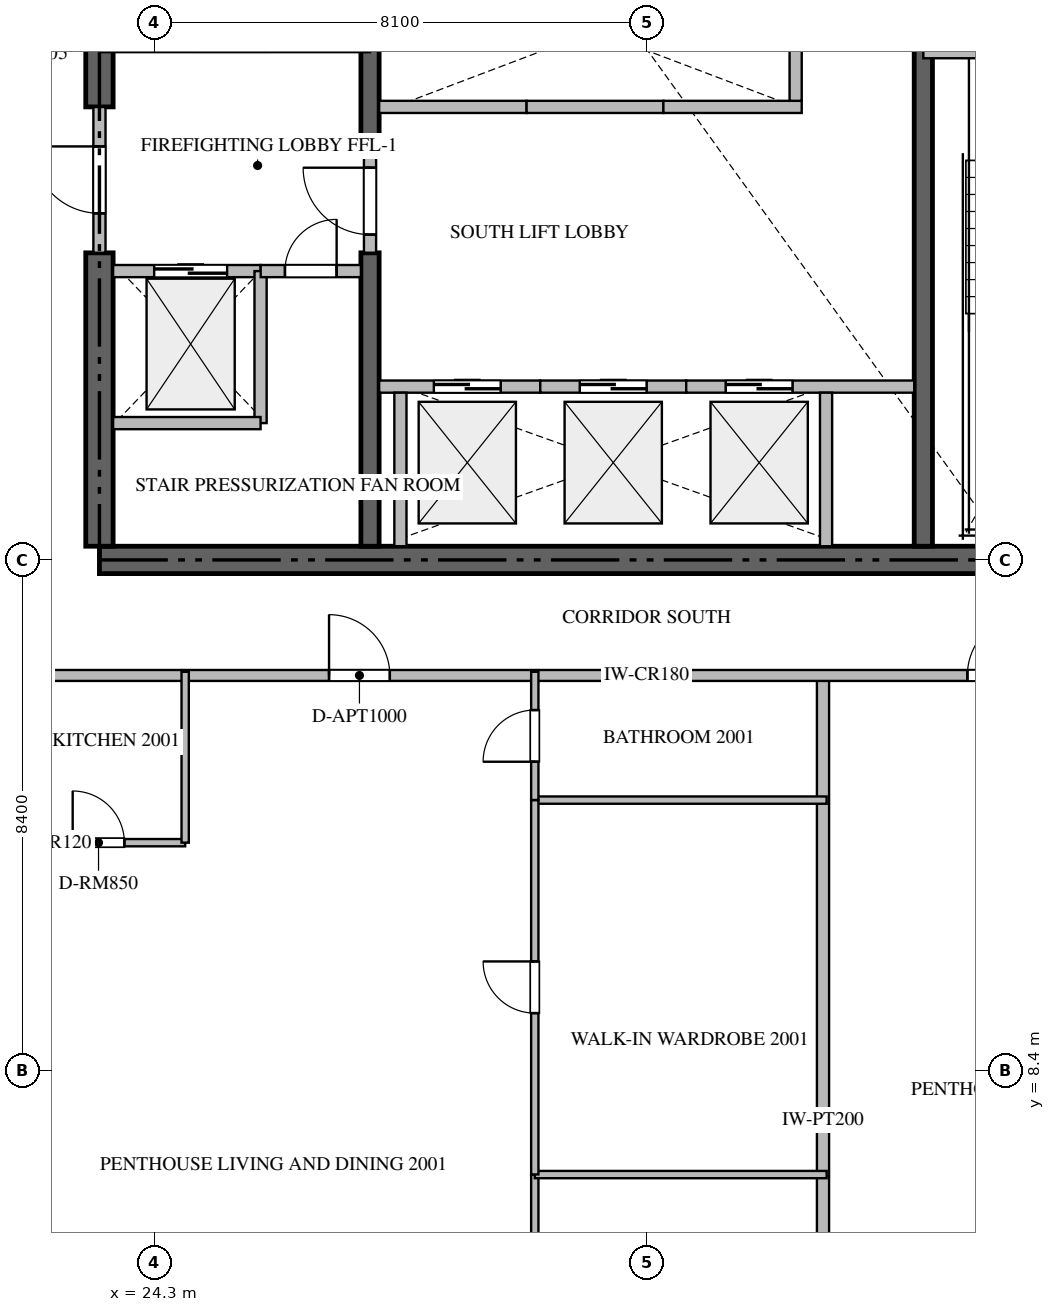
"""IFC4 building model, lengths in metres.
Left out: names, types, materials, properties, quantities, classifications, styles, units other than length and angle.
Written with IfcOpenShell. Run it as: python <this file> out.ifc"""

import sys

from ifc_helpers import new_model, si_unit, direction, frame, frame_2d, origin, place, context, subcontext, project, spatial, rectangle, extrude, source, transform, mapped, element, fill, save


model = new_model("IFC4")
c1 = context("Model", 3, precision=1e-05, world=origin(), true_north=direction((0.0, 1.0)))
c2 = subcontext(c1, "Body", "Model", "MODEL_VIEW")
j1 = project(units=[si_unit("LENGTHUNIT", "METRE"), si_unit("PLANEANGLEUNIT", "RADIAN")], contexts=[c1])
p1 = place(None, origin())
s1 = spatial("IfcSite", under=j1, at=p1, CompositionType="ELEMENT")
p2 = place(p1, origin())
s2 = spatial("IfcBuilding", under=s1, at=p2, CompositionType="ELEMENT")
p3 = place(p2, frame((0.0, 0.0, 82.95)))
s3 = spatial("IfcBuildingStorey", under=s2, at=p3, CompositionType="ELEMENT", Elevation=82.95)
p4 = place(p3, frame((23.4, 16.8, -0.26), z_axis=(0.0, 0.0, 1.0), x_axis=(1.0, 0.0, 0.0)))
e1 = element("IfcWall", 1, at=p4, inside=s3, PredefinedType="SHEAR", context=c2, shape_type="SweptSolid", body=[
    extrude(rectangle(XDim=18.0, YDim=0.45, at=frame_2d((9.0, 0.0))), origin(), (0.0, 0.0, 1.0), 3.748),
])
p5 = place(p3, frame((23.4, 17.025, -0.26), z_axis=(0.0, 0.0, 1.0), x_axis=(0.0, 1.0, 0.0)))
e2 = element("IfcWall", 2, at=p5, inside=s3, PredefinedType="SHEAR", context=c2, shape_type="SweptSolid", body=[
    extrude(rectangle(XDim=4.825, YDim=0.45, at=frame_2d((2.413, 0.0))), origin(), (0.0, 0.0, 1.0), 3.748),
])
p6 = place(p3, frame((23.4, 24.25, -0.26), z_axis=(0.0, 0.0, 1.0), x_axis=(0.0, 1.0, 0.0)))
e3 = element("IfcWall", 3, at=p6, inside=s3, PredefinedType="SHEAR", context=c2, shape_type="SweptSolid", body=[
    extrude(rectangle(XDim=9.125, YDim=0.45, at=frame_2d((4.562, 0.0))), origin(), (0.0, 0.0, 1.0), 3.748),
])
p7 = place(p3, frame((27.85, 17.025, -0.26), z_axis=(0.0, 0.0, 1.0), x_axis=(0.0, 1.0, 0.0)))
e4 = element("IfcWall", 4, at=p7, inside=s3, PredefinedType="SHEAR", context=c2, shape_type="SweptSolid", body=[
    extrude(rectangle(XDim=4.825, YDim=0.3, at=frame_2d((2.413, 0.0))), origin(), (0.0, 0.0, 1.0), 3.748),
])
p8 = place(p3, frame((27.85, 23.55, -0.26), z_axis=(0.0, 0.0, 1.0), x_axis=(0.0, 1.0, 0.0)))
e5 = element("IfcWall", 5, at=p8, inside=s3, PredefinedType="SHEAR", context=c2, shape_type="SweptSolid", body=[
    extrude(rectangle(XDim=9.825, YDim=0.3, at=frame_2d((4.913, 0.0))), origin(), (0.0, 0.0, 1.0), 3.748),
])
p9 = place(p3, frame((36.95, 17.025, -0.26), z_axis=(0.0, 0.0, 1.0), x_axis=(0.0, 1.0, 0.0)))
e6 = element("IfcWall", 6, at=p9, inside=s3, PredefinedType="SHEAR", context=c2, shape_type="SweptSolid", body=[
    extrude(rectangle(XDim=8.325, YDim=0.3, at=frame_2d((4.163, 0.0))), origin(), (0.0, 0.0, 1.0), 3.748),
])
p10 = place(p3, frame((36.95, 25.15, 0.0), z_axis=(0.0, 0.0, 1.0), x_axis=(1.0, 0.0, 0.0)))
e7 = element("IfcWall", 7, at=p10, inside=s3, PredefinedType="STANDARD", context=c2, shape_type="SweptSolid", body=[
    extrude(rectangle(XDim=4.45, YDim=0.2, at=frame_2d((2.225, 0.0))), origin(), (0.0, 0.0, 1.0), 3.49),
])
p11 = place(p10, frame((1.65, 0.0, 0.0)))
e8 = element("IfcOpeningElement", 8, at=p11, cuts=e7, PredefinedType="OPENING", context=c2, shape_type="SweptSolid", body=[
    extrude(rectangle(XDim=1.1, YDim=2.15, at=frame_2d((0.55, 1.075))), frame((0.0, 0.11, 0.0), z_axis=(0.0, -1.0, 0.0), x_axis=(1.0, 0.0, 0.0)), (0.0, 0.0, 1.0), 0.22),
])
p12 = place(p3, frame((23.625, 21.55, 0.0), z_axis=(0.0, 0.0, 1.0), x_axis=(1.0, 0.0, 0.0)))
e9 = element("IfcWall", 9, at=p12, inside=s3, PredefinedType="STANDARD", context=c2, shape_type="SweptSolid", body=[
    extrude(rectangle(XDim=2.425, YDim=0.2, at=frame_2d((1.212, 0.0))), origin(), (0.0, 0.0, 1.0), 3.49),
])
p13 = place(p12, frame((0.675, 0.0, 0.0)))
e10 = element("IfcOpeningElement", 10, at=p13, cuts=e9, PredefinedType="OPENING", context=c2, shape_type="SweptSolid", body=[
    extrude(rectangle(XDim=1.2, YDim=2.2, at=frame_2d((0.6, 1.1))), frame((0.0, 0.11, 0.0), z_axis=(0.0, -1.0, 0.0), x_axis=(1.0, 0.0, 0.0)), (0.0, 0.0, 1.0), 0.22),
])
p14 = place(p3, frame((28.0, 19.65, 0.0), z_axis=(0.0, 0.0, 1.0), x_axis=(1.0, 0.0, 0.0)))
e11 = element("IfcWall", 11, at=p14, inside=s3, PredefinedType="STANDARD", context=c2, shape_type="SweptSolid", body=[
    extrude(rectangle(XDim=2.65, YDim=0.2, at=frame_2d((1.325, 0.0))), origin(), (0.0, 0.0, 1.0), 3.49),
])
p15 = place(p14, frame((0.9, 0.0, 0.0)))
e12 = element("IfcOpeningElement", 12, at=p15, cuts=e11, PredefinedType="OPENING", context=c2, shape_type="SweptSolid", body=[
    extrude(rectangle(XDim=1.1, YDim=2.2, at=frame_2d((0.55, 1.1))), frame((0.0, 0.11, 0.0), z_axis=(0.0, -1.0, 0.0), x_axis=(1.0, 0.0, 0.0)), (0.0, 0.0, 1.0), 0.22),
])
p16 = place(p3, frame((28.35, 17.025, 0.0), z_axis=(0.0, 0.0, 1.0), x_axis=(0.0, 1.0, 0.0)))
e13 = element("IfcWall", 13, at=p16, inside=s3, PredefinedType="STANDARD", context=c2, shape_type="SweptSolid", body=[
    extrude(rectangle(XDim=2.525, YDim=0.2, at=frame_2d((1.263, 0.0))), origin(), (0.0, 0.0, 1.0), 3.49),
])
p17 = place(p3, frame((30.65, 19.65, 0.0), z_axis=(0.0, 0.0, 1.0), x_axis=(1.0, 0.0, 0.0)))
e14 = element("IfcWall", 14, at=p17, inside=s3, PredefinedType="STANDARD", context=c2, shape_type="SweptSolid", body=[
    extrude(rectangle(XDim=2.4, YDim=0.2, at=frame_2d((1.2, 0.0))), origin(), (0.0, 0.0, 1.0), 3.49),
])
p18 = place(p17, frame((0.65, 0.0, 0.0)))
e15 = element("IfcOpeningElement", 15, at=p18, cuts=e14, PredefinedType="OPENING", context=c2, shape_type="SweptSolid", body=[
    extrude(rectangle(XDim=1.1, YDim=2.2, at=frame_2d((0.55, 1.1))), frame((0.0, 0.11, 0.0), z_axis=(0.0, -1.0, 0.0), x_axis=(1.0, 0.0, 0.0)), (0.0, 0.0, 1.0), 0.22),
])
p19 = place(p3, frame((33.05, 19.65, 0.0), z_axis=(0.0, 0.0, 1.0), x_axis=(1.0, 0.0, 0.0)))
e16 = element("IfcWall", 16, at=p19, inside=s3, PredefinedType="STANDARD", context=c2, shape_type="SweptSolid", body=[
    extrude(rectangle(XDim=3.75, YDim=0.2, at=frame_2d((1.875, 0.0))), origin(), (0.0, 0.0, 1.0), 3.49),
])
p20 = place(p19, frame((0.65, 0.0, 0.0)))
e17 = element("IfcOpeningElement", 17, at=p20, cuts=e16, PredefinedType="OPENING", context=c2, shape_type="SweptSolid", body=[
    extrude(rectangle(XDim=1.1, YDim=2.2, at=frame_2d((0.55, 1.1))), frame((0.0, 0.11, 0.0), z_axis=(0.0, -1.0, 0.0), x_axis=(1.0, 0.0, 0.0)), (0.0, 0.0, 1.0), 0.22),
])
p21 = place(p3, frame((35.35, 17.025, 0.0), z_axis=(0.0, 0.0, 1.0), x_axis=(0.0, 1.0, 0.0)))
e18 = element("IfcWall", 18, at=p21, inside=s3, PredefinedType="STANDARD", context=c2, shape_type="SweptSolid", body=[
    extrude(rectangle(XDim=2.525, YDim=0.2, at=frame_2d((1.263, 0.0))), origin(), (0.0, 0.0, 1.0), 3.49),
])
p22 = place(p3, frame((28.0, 24.25, 0.0), z_axis=(0.0, 0.0, 1.0), x_axis=(1.0, 0.0, 0.0)))
e19 = element("IfcWall", 19, at=p22, inside=s3, PredefinedType="STANDARD", context=c2, shape_type="SweptSolid", body=[
    extrude(rectangle(XDim=2.425, YDim=0.2, at=frame_2d((1.212, 0.0))), origin(), (0.0, 0.0, 1.0), 3.49),
])
p23 = place(p3, frame((30.425, 24.25, 0.0), z_axis=(0.0, 0.0, 1.0), x_axis=(1.0, 0.0, 0.0)))
e20 = element("IfcWall", 20, at=p23, inside=s3, PredefinedType="STANDARD", context=c2, shape_type="SweptSolid", body=[
    extrude(rectangle(XDim=2.25, YDim=0.2, at=frame_2d((1.125, 0.0))), origin(), (0.0, 0.0, 1.0), 3.49),
])
p24 = place(p3, frame((32.675, 24.25, 0.0), z_axis=(0.0, 0.0, 1.0), x_axis=(1.0, 0.0, 0.0)))
e21 = element("IfcWall", 21, at=p24, inside=s3, PredefinedType="STANDARD", context=c2, shape_type="SweptSolid", body=[
    extrude(rectangle(XDim=2.275, YDim=0.2, at=frame_2d((1.137, 0.0))), origin(), (0.0, 0.0, 1.0), 3.49),
])
for number, where, z_axis, x_axis in (
    (22, (34.85, 24.35, 0.0), (0.0, 0.0, 1.0), (0.0, 1.0, 0.0)),
    (23, (26.05, 19.05, 0.0), (0.0, 0.0, 1.0), (0.0, 1.0, 0.0)),
):
    element("IfcWall", number, at=place(p3, frame(where, z_axis=z_axis, x_axis=x_axis)), inside=s3, PredefinedType="STANDARD", context=c2, shape_type="SweptSolid", body=[
        extrude(rectangle(XDim=2.5, YDim=0.2, at=frame_2d((1.25, 0.0))), origin(), (0.0, 0.0, 1.0), 3.49),
    ])
p25 = place(p3, frame((23.625, 19.05, 0.0), z_axis=(0.0, 0.0, 1.0), x_axis=(1.0, 0.0, 0.0)))
e24 = element("IfcWall", 24, at=p25, inside=s3, PredefinedType="STANDARD", context=c2, shape_type="SweptSolid", body=[
    extrude(rectangle(XDim=2.425, YDim=0.2, at=frame_2d((1.212, 0.0))), origin(), (0.0, 0.0, 1.0), 3.49),
])
p26 = place(p3, frame((26.052, 21.55, 0.0), z_axis=(0.0, 0.0, 1.0), x_axis=(1.0, 0.0, 0.0)))
e25 = element("IfcWall", 25, at=p26, inside=s3, PredefinedType="STANDARD", context=c2, shape_type="SweptSolid", body=[
    extrude(rectangle(XDim=1.648, YDim=0.2, at=frame_2d((0.824, 0.0))), origin(), (0.0, 0.0, 1.0), 3.49),
])
p27 = place(p26, frame((0.399, 0.0, 0.0)))
e26 = element("IfcOpeningElement", 26, at=p27, cuts=e25, PredefinedType="OPENING", context=c2, shape_type="SweptSolid", body=[
    extrude(rectangle(XDim=0.85, YDim=2.1, at=frame_2d((0.425, 1.05))), frame((0.0, 0.11, 0.0), z_axis=(0.0, -1.0, 0.0), x_axis=(1.0, 0.0, 0.0)), (0.0, 0.0, 1.0), 0.22),
])
p28 = place(p3, frame((23.4, 21.852, 0.0), z_axis=(0.0, 0.0, 1.0), x_axis=(0.0, 1.0, 0.0)))
e27 = element("IfcWall", 27, at=p28, inside=s3, PredefinedType="STANDARD", context=c2, shape_type="SweptSolid", body=[
    extrude(rectangle(XDim=2.396, YDim=0.2, at=frame_2d((1.198, 0.0))), origin(), (0.0, 0.0, 1.0), 3.49),
])
p29 = place(p28, frame((0.648, 0.0, 0.0)))
e28 = element("IfcOpeningElement", 28, at=p29, cuts=e27, PredefinedType="OPENING", context=c2, shape_type="SweptSolid", body=[
    extrude(rectangle(XDim=1.1, YDim=2.15, at=frame_2d((0.55, 1.075))), frame((0.0, 0.11, 0.0), z_axis=(0.0, -1.0, 0.0), x_axis=(1.0, 0.0, 0.0)), (0.0, 0.0, 1.0), 0.22),
])
p30 = place(p3, frame((27.85, 21.852, 0.0), z_axis=(0.0, 0.0, 1.0), x_axis=(0.0, 1.0, 0.0)))
e29 = element("IfcWall", 29, at=p30, inside=s3, PredefinedType="STANDARD", context=c2, shape_type="SweptSolid", body=[
    extrude(rectangle(XDim=1.696, YDim=0.2, at=frame_2d((0.848, 0.0))), origin(), (0.0, 0.0, 1.0), 3.49),
])
p31 = place(p30, frame((0.298, 0.0, 0.0)))
e30 = element("IfcOpeningElement", 30, at=p31, cuts=e29, PredefinedType="OPENING", context=c2, shape_type="SweptSolid", body=[
    extrude(rectangle(XDim=1.1, YDim=2.15, at=frame_2d((0.55, 1.075))), frame((0.0, 0.11, 0.0), z_axis=(0.0, -1.0, 0.0), x_axis=(1.0, 0.0, 0.0)), (0.0, 0.0, 1.0), 0.22),
])
p32 = place(p3, frame((35.3, 0.282, 0.0), z_axis=(0.0, 0.0, 1.0), x_axis=(0.0, 1.0, 0.0)))
e31 = element("IfcWall", 31, at=p32, inside=s3, PredefinedType="PARTITIONING", context=c2, shape_type="SweptSolid", body=[
    extrude(rectangle(XDim=14.618, YDim=0.2, at=frame_2d((7.309, 0.0))), origin(), (0.0, 0.0, 1.0), 3.49),
])
p33 = place(p3, frame((21.402, 14.9, 0.0), z_axis=(0.0, 0.0, 1.0), x_axis=(1.0, 0.0, 0.0)))
e32 = element("IfcWall", 32, at=p33, inside=s3, PredefinedType="PARTITIONING", context=c2, shape_type="SweptSolid", body=[
    extrude(rectangle(XDim=21.996, YDim=0.18, at=frame_2d((10.998, 0.0))), origin(), (0.0, 0.0, 1.0), 3.49),
])
p34 = place(p33, frame((5.774, 0.0, 0.0)))
e33 = element("IfcOpeningElement", 33, at=p34, cuts=e32, PredefinedType="OPENING", context=c2, shape_type="SweptSolid", body=[
    extrude(rectangle(XDim=1.0, YDim=2.15, at=frame_2d((0.5, 1.075))), frame((0.0, 0.1, 0.0), z_axis=(0.0, -1.0, 0.0), x_axis=(1.0, 0.0, 0.0)), (0.0, 0.0, 1.0), 0.2),
])
p35 = place(p33, frame((16.272, 0.0, 0.0)))
e34 = element("IfcOpeningElement", 34, at=p35, cuts=e32, PredefinedType="OPENING", context=c2, shape_type="SweptSolid", body=[
    extrude(rectangle(XDim=1.0, YDim=2.15, at=frame_2d((0.5, 1.075))), frame((0.0, 0.1, 0.0), z_axis=(0.0, -1.0, 0.0), x_axis=(1.0, 0.0, 0.0)), (0.0, 0.0, 1.0), 0.2),
])
p36 = place(p3, frame((21.96, 12.15, 0.0), z_axis=(0.0, 0.0, 1.0), x_axis=(1.0, 0.0, 0.0)))
e35 = element("IfcWall", 35, at=p36, inside=s3, PredefinedType="PARTITIONING", context=c2, shape_type="SweptSolid", body=[
    extrude(rectangle(XDim=2.85, YDim=0.12, at=frame_2d((1.425, 0.0))), origin(), (0.0, 0.0, 1.0), 3.49),
])
p37 = place(p36, frame((1.0, 0.0, 0.0)))
e36 = element("IfcOpeningElement", 36, at=p37, cuts=e35, PredefinedType="OPENING", context=c2, shape_type="SweptSolid", body=[
    extrude(rectangle(XDim=0.85, YDim=2.1, at=frame_2d((0.425, 1.05))), frame((0.0, 0.07, 0.0), z_axis=(0.0, -1.0, 0.0), x_axis=(1.0, 0.0, 0.0)), (0.0, 0.0, 1.0), 0.14),
])
p38 = place(p3, frame((24.81, 12.15, 0.0), z_axis=(0.0, 0.0, 1.0), x_axis=(0.0, 1.0, 0.0)))
e37 = element("IfcWall", 37, at=p38, inside=s3, PredefinedType="PARTITIONING", context=c2, shape_type="SweptSolid", body=[
    extrude(rectangle(XDim=2.81, YDim=0.12, at=frame_2d((1.405, 0.0))), origin(), (0.0, 0.0, 1.0), 3.49),
])
p39 = place(p3, frame((30.56, 0.295, 0.0), z_axis=(0.0, 0.0, 1.0), x_axis=(0.0, 1.0, 0.0)))
e38 = element("IfcWall", 38, at=p39, inside=s3, PredefinedType="PARTITIONING", context=c2, shape_type="SweptSolid", body=[
    extrude(rectangle(XDim=6.397, YDim=0.12, at=frame_2d((3.198, 0.0))), origin(), (0.0, 0.0, 1.0), 3.49),
])
p40 = place(p39, frame((3.023, 0.0, 0.0)))
e39 = element("IfcOpeningElement", 39, at=p40, cuts=e38, PredefinedType="OPENING", context=c2, shape_type="SweptSolid", body=[
    extrude(rectangle(XDim=0.9, YDim=2.1, at=frame_2d((0.45, 1.05))), frame((0.0, 0.07, 0.0), z_axis=(0.0, -1.0, 0.0), x_axis=(1.0, 0.0, 0.0)), (0.0, 0.0, 1.0), 0.14),
])
for number, where, z_axis, x_axis in (
    (40, (30.56, 6.692, 0.0), (0.0, 0.0, 1.0), (1.0, 0.0, 0.0)),
    (41, (30.56, 12.85, 0.0), (0.0, 0.0, 1.0), (1.0, 0.0, 0.0)),
):
    element("IfcWall", number, at=place(p3, frame(where, z_axis=z_axis, x_axis=x_axis)), inside=s3, PredefinedType="PARTITIONING", context=c2, shape_type="SweptSolid", body=[
        extrude(rectangle(XDim=4.8, YDim=0.12, at=frame_2d((2.4, 0.0))), origin(), (0.0, 0.0, 1.0), 3.49),
    ])
p41 = place(p3, frame((30.56, 6.694, 0.0), z_axis=(0.0, 0.0, 1.0), x_axis=(0.0, 1.0, 0.0)))
e42 = element("IfcWall", 42, at=p41, inside=s3, PredefinedType="PARTITIONING", context=c2, shape_type="SweptSolid", body=[
    extrude(rectangle(XDim=6.156, YDim=0.12, at=frame_2d((3.078, 0.0))), origin(), (0.0, 0.0, 1.0), 3.49),
])
p42 = place(p41, frame((2.653, 0.0, 0.0)))
e43 = element("IfcOpeningElement", 43, at=p42, cuts=e42, PredefinedType="OPENING", context=c2, shape_type="SweptSolid", body=[
    extrude(rectangle(XDim=0.85, YDim=2.1, at=frame_2d((0.425, 1.05))), frame((0.0, 0.07, 0.0), z_axis=(0.0, -1.0, 0.0), x_axis=(1.0, 0.0, 0.0)), (0.0, 0.0, 1.0), 0.14),
])
p43 = place(p3, frame((30.56, 12.852, 0.0), z_axis=(0.0, 0.0, 1.0), x_axis=(0.0, 1.0, 0.0)))
e44 = element("IfcWall", 44, at=p43, inside=s3, PredefinedType="PARTITIONING", context=c2, shape_type="SweptSolid", body=[
    extrude(rectangle(XDim=2.108, YDim=0.12, at=frame_2d((1.054, 0.0))), origin(), (0.0, 0.0, 1.0), 3.49),
])
p44 = place(p43, frame((0.629, 0.0, 0.0)))
e45 = element("IfcOpeningElement", 45, at=p44, cuts=e44, PredefinedType="OPENING", context=c2, shape_type="SweptSolid", body=[
    extrude(rectangle(XDim=0.85, YDim=2.1, at=frame_2d((0.425, 1.05))), frame((0.0, 0.07, 0.0), z_axis=(0.0, -1.0, 0.0), x_axis=(1.0, 0.0, 0.0)), (0.0, 0.0, 1.0), 0.14),
])
m1 = source(origin(), c2, "Body", "SweptSolid", [
    extrude(rectangle(XDim=1.2, YDim=2.2, at=frame_2d((0.6, 1.1))), frame((0.0, 0.025, 0.0), z_axis=(0.0, -1.0, 0.0), x_axis=(1.0, 0.0, 0.0)), (0.0, 0.0, 1.0), 0.05),
])
p45 = place(p13, origin())
e46 = element("IfcDoor", 46, at=p45, inside=s3, OperationType="DOUBLE_DOOR_SLIDING", PredefinedType="DOOR", context=c2, shape_type="MappedRepresentation", body=[
    mapped(m1, transform((0.0, 0.0, 0.0), scale=1.0)),
])
fill(e10, e46)
m2 = source(origin(), c2, "Body", "SweptSolid", [
    extrude(rectangle(XDim=1.1, YDim=2.2, at=frame_2d((0.55, 1.1))), frame((0.0, 0.025, 0.0), z_axis=(0.0, -1.0, 0.0), x_axis=(1.0, 0.0, 0.0)), (0.0, 0.0, 1.0), 0.05),
])
p46 = place(p15, origin())
e47 = element("IfcDoor", 47, at=p46, inside=s3, OperationType="DOUBLE_DOOR_SLIDING", PredefinedType="DOOR", context=c2, shape_type="MappedRepresentation", body=[
    mapped(m2, transform((0.0, 0.0, 0.0), scale=1.0)),
])
fill(e12, e47)
p47 = place(p18, origin())
e48 = element("IfcDoor", 48, at=p47, inside=s3, OperationType="DOUBLE_DOOR_SLIDING", PredefinedType="DOOR", context=c2, shape_type="MappedRepresentation", body=[
    mapped(m2, transform((0.0, 0.0, 0.0), scale=1.0)),
])
fill(e15, e48)
p48 = place(p20, origin())
e49 = element("IfcDoor", 49, at=p48, inside=s3, OperationType="DOUBLE_DOOR_SLIDING", PredefinedType="DOOR", context=c2, shape_type="MappedRepresentation", body=[
    mapped(m2, transform((0.0, 0.0, 0.0), scale=1.0)),
])
fill(e17, e49)
m3 = source(origin(), c2, "Body", "SweptSolid", [
    extrude(rectangle(XDim=0.85, YDim=2.1, at=frame_2d((0.425, 1.05))), frame((0.0, 0.025, 0.0), z_axis=(0.0, -1.0, 0.0), x_axis=(1.0, 0.0, 0.0)), (0.0, 0.0, 1.0), 0.05),
])
p49 = place(p27, origin())
e50 = element("IfcDoor", 50, at=p49, inside=s3, OperationType="SINGLE_SWING_RIGHT", PredefinedType="DOOR", context=c2, shape_type="MappedRepresentation", body=[
    mapped(m3, transform((0.0, 0.0, 0.0), scale=1.0)),
])
fill(e26, e50)
m4 = source(origin(), c2, "Body", "SweptSolid", [
    extrude(rectangle(XDim=1.1, YDim=2.15, at=frame_2d((0.55, 1.075))), frame((0.0, 0.025, 0.0), z_axis=(0.0, -1.0, 0.0), x_axis=(1.0, 0.0, 0.0)), (0.0, 0.0, 1.0), 0.05),
])
p50 = place(p29, origin())
e51 = element("IfcDoor", 51, at=p50, inside=s3, OperationType="SINGLE_SWING_RIGHT", PredefinedType="DOOR", context=c2, shape_type="MappedRepresentation", body=[
    mapped(m4, transform((0.0, 0.0, 0.0), scale=1.0)),
])
fill(e28, e51)
p51 = place(p31, origin())
e52 = element("IfcDoor", 52, at=p51, inside=s3, OperationType="SINGLE_SWING_RIGHT", PredefinedType="DOOR", context=c2, shape_type="MappedRepresentation", body=[
    mapped(m4, transform((0.0, 0.0, 0.0), scale=1.0)),
])
fill(e30, e52)
m5 = source(origin(), c2, "Body", "SweptSolid", [
    extrude(rectangle(XDim=1.0, YDim=2.15, at=frame_2d((0.5, 1.075))), frame((0.0, 0.025, 0.0), z_axis=(0.0, -1.0, 0.0), x_axis=(1.0, 0.0, 0.0)), (0.0, 0.0, 1.0), 0.05),
])
p52 = place(p34, origin())
e53 = element("IfcDoor", 53, at=p52, inside=s3, OperationType="SINGLE_SWING_LEFT", PredefinedType="DOOR", context=c2, shape_type="MappedRepresentation", body=[
    mapped(m5, transform((0.0, 0.0, 0.0), scale=1.0)),
])
fill(e33, e53)
p53 = place(p35, origin())
e54 = element("IfcDoor", 54, at=p53, inside=s3, OperationType="SINGLE_SWING_RIGHT", PredefinedType="DOOR", context=c2, shape_type="MappedRepresentation", body=[
    mapped(m5, transform((0.0, 0.0, 0.0), scale=1.0)),
])
fill(e34, e54)
p54 = place(p37, origin())
e55 = element("IfcDoor", 55, at=p54, inside=s3, OperationType="SINGLE_SWING_LEFT", PredefinedType="DOOR", context=c2, shape_type="MappedRepresentation", body=[
    mapped(m3, transform((0.0, 0.0, 0.0), scale=1.0)),
])
fill(e36, e55)
p55 = place(p42, origin())
e56 = element("IfcDoor", 56, at=p55, inside=s3, OperationType="SINGLE_SWING_RIGHT", PredefinedType="DOOR", context=c2, shape_type="MappedRepresentation", body=[
    mapped(m3, transform((0.0, 0.0, 0.0), scale=1.0)),
])
fill(e43, e56)
p56 = place(p44, origin())
e57 = element("IfcDoor", 57, at=p56, inside=s3, OperationType="SINGLE_SWING_LEFT", PredefinedType="DOOR", context=c2, shape_type="MappedRepresentation", body=[
    mapped(m3, transform((0.0, 0.0, 0.0), scale=1.0)),
])
fill(e45, e57)
save(model, sys.argv[1])
